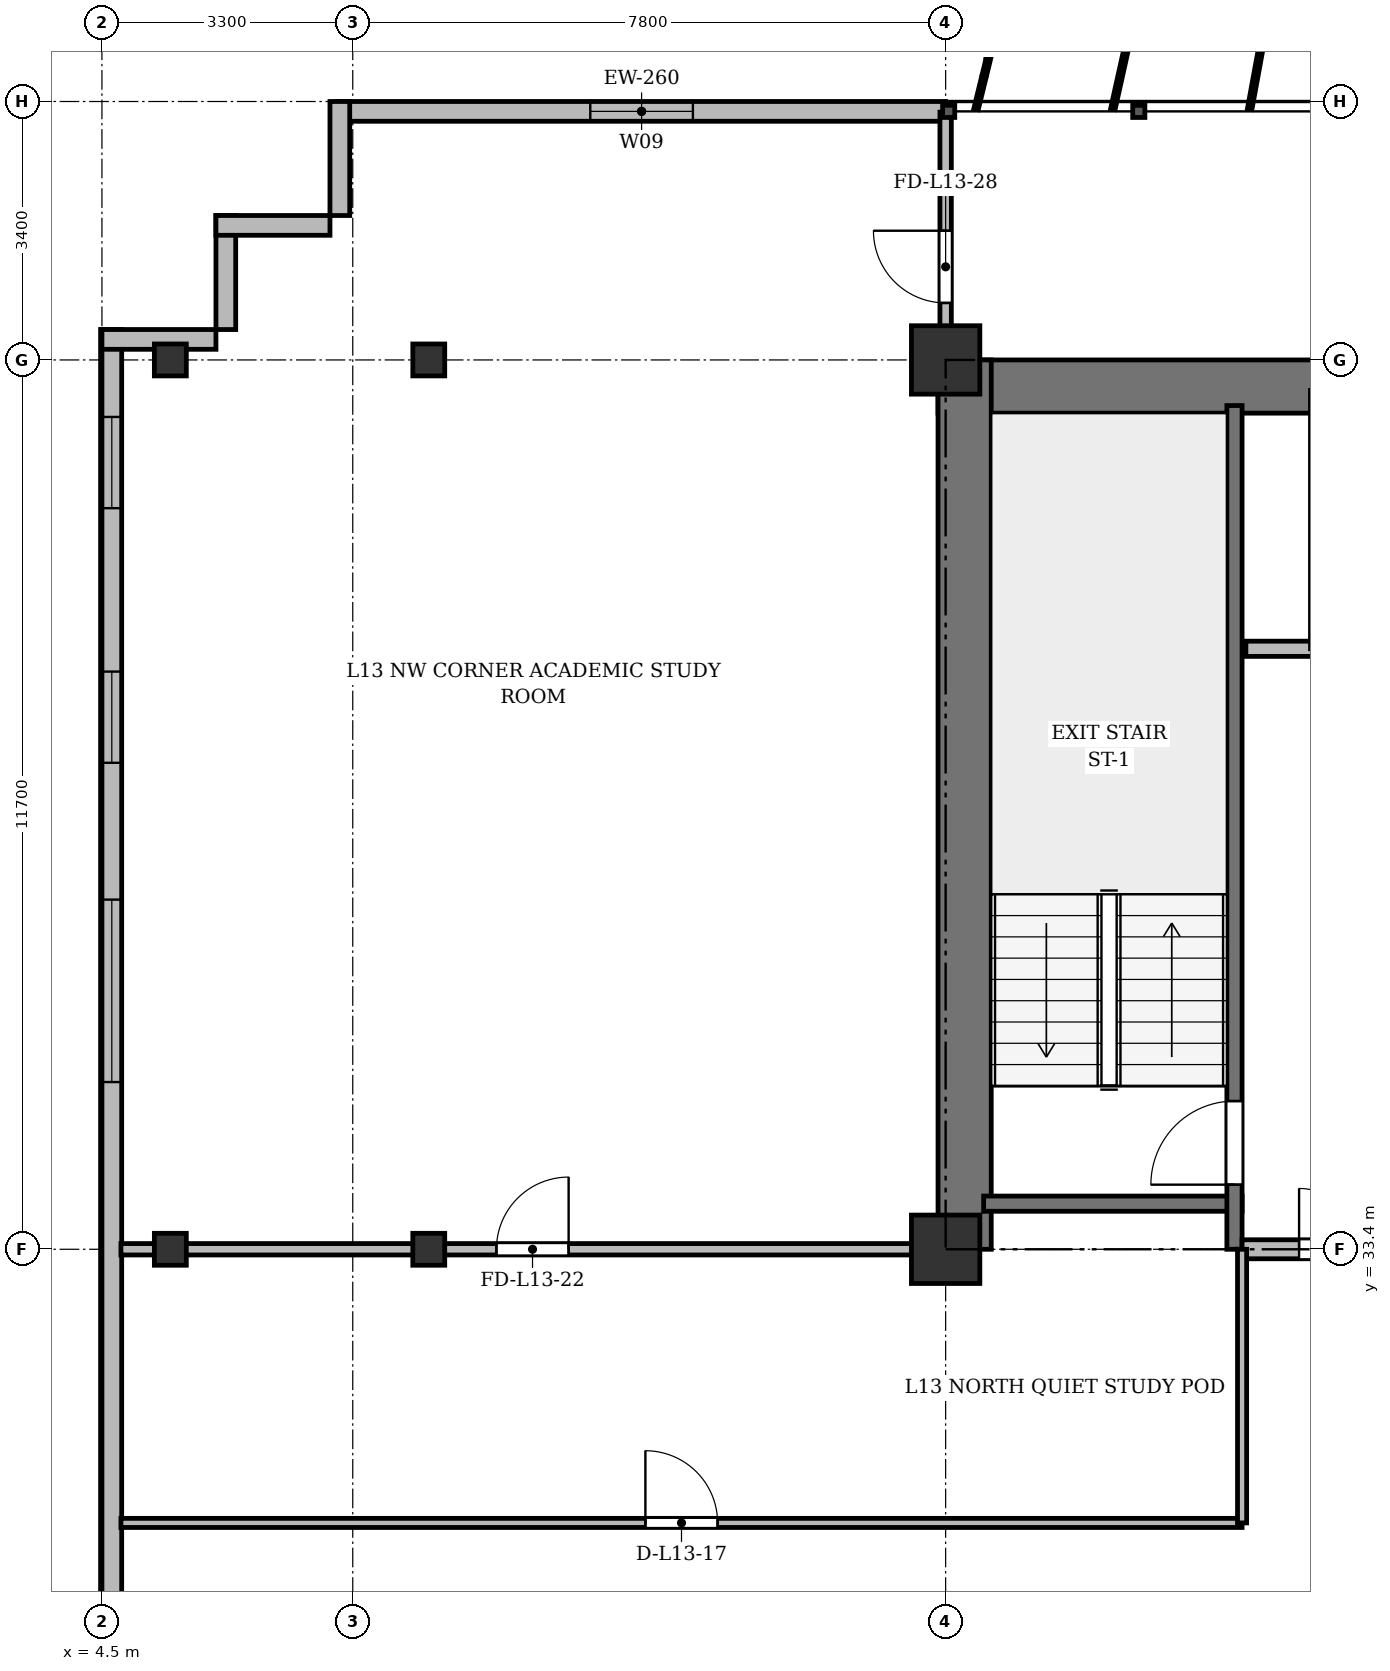
"""IFC4 building model, lengths in metres.
Left out: names, types, materials, properties, quantities, classifications, styles, units other than length and angle.
Written with IfcOpenShell. Run it as: python <this file> out.ifc"""

import sys

from ifc_helpers import new_model, si_unit, direction, frame, frame_2d, origin, origin_2d, place, context, subcontext, project, spatial, rectangle, i_section, extrude, source, transform, mapped, element, fill, save


model = new_model("IFC4")
c1 = context("Model", 3, precision=1e-05, world=origin(), true_north=direction((0.0, 1.0)))
c2 = subcontext(c1, "Body", "Model", "MODEL_VIEW")
j1 = project(units=[si_unit("LENGTHUNIT", "METRE"), si_unit("PLANEANGLEUNIT", "RADIAN")], contexts=[c1])
p1 = place(None, origin())
s1 = spatial("IfcSite", under=j1, at=p1, CompositionType="ELEMENT")
p2 = place(p1, origin())
s2 = spatial("IfcBuilding", under=s1, at=p2, CompositionType="ELEMENT")
p3 = place(p2, frame((0.0, 0.0, 52.3)))
s3 = spatial("IfcBuildingStorey", under=s2, at=p3, CompositionType="ELEMENT", Elevation=52.3)
m1 = source(origin(), c2, "Body", "SweptSolid", [
    extrude(i_section(OverallWidth=0.42, OverallDepth=0.42, WebThickness=0.026, FlangeThickness=0.04, at=origin_2d()), origin(), (0.0, 0.0, 1.0), 3.6),
])
for number, where, z_axis, x_axis in (
    (1, (5.4, 33.4, 0.0), (0.0, 0.0, 1.0), (1.0, 0.0, 0.0)),
    (2, (5.4, 45.1, 0.0), (0.0, 0.0, 1.0), (1.0, 0.0, 0.0)),
    (3, (8.8, 33.4, 0.0), (0.0, 0.0, 1.0), (1.0, 0.0, 0.0)),
    (4, (8.8, 45.1, 0.0), (0.0, 0.0, 1.0), (1.0, 0.0, 0.0)),
):
    element("IfcColumn", number, at=place(p3, frame(where, z_axis=z_axis, x_axis=x_axis)), inside=s3, PredefinedType="COLUMN", context=c2, shape_type="MappedRepresentation", body=[
        mapped(m1, transform((0.0, 0.0, 0.0), x_axis=(1.0, 0.0, 0.0), y_axis=(0.0, 1.0, 0.0), z_axis=(0.0, 0.0, 1.0), scale=1.0)),
    ])
m2 = source(origin(), c2, "Body", "SweptSolid", [
    extrude(rectangle(XDim=0.9, YDim=0.9, at=origin_2d()), origin(), (0.0, 0.0, 1.0), 3.6),
])
for number, where, z_axis, x_axis in (
    (5, (15.6, 33.4, 0.0), (0.0, 0.0, 1.0), (1.0, 0.0, 0.0)),
    (6, (15.6, 45.1, 0.0), (0.0, 0.0, 1.0), (1.0, 0.0, 0.0)),
):
    element("IfcColumn", number, at=place(p3, frame(where, z_axis=z_axis, x_axis=x_axis)), inside=s3, PredefinedType="COLUMN", context=c2, shape_type="MappedRepresentation", body=[
        mapped(m2, transform((0.0, 0.0, 0.0), x_axis=(1.0, 0.0, 0.0), y_axis=(0.0, 1.0, 0.0), z_axis=(0.0, 0.0, 1.0), scale=1.0)),
    ])
p4 = place(p3, frame((7.6, 48.37, 0.0), z_axis=(0.0, 0.0, 1.0), x_axis=(1.0, 0.0, 0.0)))
e7 = element("IfcWall", 7, at=p4, inside=s3, PredefinedType="SOLIDWALL", context=c2, shape_type="SweptSolid", body=[
    extrude(rectangle(XDim=8.0, YDim=0.26, at=frame_2d((4.0, 0.0))), origin(), (0.0, 0.0, 1.0), 3.34),
])
p5 = place(p4, frame((3.325, 0.0, 0.9)))
e8 = element("IfcOpeningElement", 8, at=p5, cuts=e7, PredefinedType="OPENING", context=c2, shape_type="SweptSolid", body=[
    extrude(rectangle(XDim=1.35, YDim=1.5, at=frame_2d((0.675, 0.75))), frame((0.0, 0.14, 0.0), z_axis=(0.0, -1.0, 0.0), x_axis=(1.0, 0.0, 0.0)), (0.0, 0.0, 1.0), 0.28),
])
p6 = place(p3, frame((4.63, 5.9, 0.0), z_axis=(0.0, 0.0, 1.0), x_axis=(0.0, 1.0, 0.0)))
e9 = element("IfcWall", 9, at=p6, inside=s3, PredefinedType="SOLIDWALL", context=c2, shape_type="SweptSolid", body=[
    extrude(rectangle(XDim=39.6, YDim=0.26, at=frame_2d((19.8, 0.0))), origin(), (0.0, 0.0, 1.0), 3.34),
])
p7 = place(p6, frame((1.45, 0.0, 0.92)))
e10 = element("IfcOpeningElement", 10, at=p7, cuts=e9, PredefinedType="OPENING", context=c2, shape_type="SweptSolid", body=[
    extrude(rectangle(XDim=1.2, YDim=1.65, at=frame_2d((0.6, 0.825))), frame((0.0, 0.14, 0.0), z_axis=(0.0, -1.0, 0.0), x_axis=(1.0, 0.0, 0.0)), (0.0, 0.0, 1.0), 0.28),
])
p8 = place(p6, frame((4.3, 0.0, 0.92)))
e11 = element("IfcOpeningElement", 11, at=p8, cuts=e9, PredefinedType="OPENING", context=c2, shape_type="SweptSolid", body=[
    extrude(rectangle(XDim=2.4, YDim=2.1, at=frame_2d((1.2, 1.05))), frame((0.0, 0.14, 0.0), z_axis=(0.0, -1.0, 0.0), x_axis=(1.0, 0.0, 0.0)), (0.0, 0.0, 1.0), 0.28),
])
p9 = place(p6, frame((8.5, 0.0, 0.92)))
e12 = element("IfcOpeningElement", 12, at=p9, cuts=e9, PredefinedType="OPENING", context=c2, shape_type="SweptSolid", body=[
    extrude(rectangle(XDim=2.4, YDim=2.1, at=frame_2d((1.2, 1.05))), frame((0.0, 0.14, 0.0), z_axis=(0.0, -1.0, 0.0), x_axis=(1.0, 0.0, 0.0)), (0.0, 0.0, 1.0), 0.28),
])
p10 = place(p6, frame((29.7, 0.0, 0.92)))
e13 = element("IfcOpeningElement", 13, at=p10, cuts=e9, PredefinedType="OPENING", context=c2, shape_type="SweptSolid", body=[
    extrude(rectangle(XDim=2.4, YDim=2.1, at=frame_2d((1.2, 1.05))), frame((0.0, 0.14, 0.0), z_axis=(0.0, -1.0, 0.0), x_axis=(1.0, 0.0, 0.0)), (0.0, 0.0, 1.0), 0.28),
])
p11 = place(p6, frame((33.9, 0.0, 0.92)))
e14 = element("IfcOpeningElement", 14, at=p11, cuts=e9, PredefinedType="OPENING", context=c2, shape_type="SweptSolid", body=[
    extrude(rectangle(XDim=1.2, YDim=1.65, at=frame_2d((0.6, 0.825))), frame((0.0, 0.14, 0.0), z_axis=(0.0, -1.0, 0.0), x_axis=(1.0, 0.0, 0.0)), (0.0, 0.0, 1.0), 0.28),
])
p12 = place(p6, frame((37.25, 0.0, 0.92)))
e15 = element("IfcOpeningElement", 15, at=p12, cuts=e9, PredefinedType="OPENING", context=c2, shape_type="SweptSolid", body=[
    extrude(rectangle(XDim=1.2, YDim=1.65, at=frame_2d((0.6, 0.825))), frame((0.0, 0.14, 0.0), z_axis=(0.0, -1.0, 0.0), x_axis=(1.0, 0.0, 0.0)), (0.0, 0.0, 1.0), 0.28),
])
p13 = place(p3, frame((4.5, 45.37, 0.0), z_axis=(0.0, 0.0, 1.0), x_axis=(1.0, 0.0, 0.0)))
e16 = element("IfcWall", 16, at=p13, inside=s3, PredefinedType="SOLIDWALL", context=c2, shape_type="SweptSolid", body=[
    extrude(rectangle(XDim=1.5, YDim=0.26, at=frame_2d((0.75, 0.0))), origin(), (0.0, 0.0, 1.0), 2.69),
])
for number, where, z_axis, x_axis in (
    (17, (6.13, 45.5, 0.0), (0.0, 0.0, 1.0), (0.0, 1.0, 0.0)),
    (18, (6.0, 46.87, 0.0), (0.0, 0.0, 1.0), (1.0, 0.0, 0.0)),
    (19, (7.63, 47.0, 0.0), (0.0, 0.0, 1.0), (0.0, 1.0, 0.0)),
):
    element("IfcWall", number, at=place(p3, frame(where, z_axis=z_axis, x_axis=x_axis)), inside=s3, PredefinedType="SOLIDWALL", context=c2, shape_type="SweptSolid", body=[
        extrude(rectangle(XDim=1.5, YDim=0.26, at=frame_2d((0.75, 0.0))), origin(), (0.0, 0.0, 1.0), 3.34),
    ])
p14 = place(p3, frame((15.5, 44.75, 0.0), z_axis=(0.0, 0.0, 1.0), x_axis=(1.0, 0.0, 0.0)))
e20 = element("IfcWall", 20, at=p14, inside=s3, PredefinedType="SHEAR", context=c2, shape_type="SweptSolid", body=[
    extrude(rectangle(XDim=43.4, YDim=0.7, at=frame_2d((21.7, 0.0))), origin(), (0.0, 0.0, 1.0), 3.34),
])
p15 = place(p3, frame((15.85, 33.4, 0.0), z_axis=(0.0, 0.0, 1.0), x_axis=(0.0, 1.0, 0.0)))
e21 = element("IfcWall", 21, at=p15, inside=s3, PredefinedType="SHEAR", context=c2, shape_type="SweptSolid", body=[
    extrude(rectangle(XDim=11.7, YDim=0.7, at=frame_2d((5.85, 0.0))), origin(), (0.0, 0.0, 1.0), 3.34),
])
p16 = place(p3, frame((16.1, 34.0, 0.0), z_axis=(0.0, 0.0, 1.0), x_axis=(1.0, 0.0, 0.0)))
e22 = element("IfcWall", 22, at=p16, inside=s3, PredefinedType="SHEAR", context=c2, shape_type="SweptSolid", body=[
    extrude(rectangle(XDim=3.4, YDim=0.2, at=frame_2d((1.7, 0.0))), origin(), (0.0, 0.0, 1.0), 3.34),
])
p17 = place(p3, frame((19.4, 33.4, 0.0), z_axis=(0.0, 0.0, 1.0), x_axis=(0.0, 1.0, 0.0)))
e23 = element("IfcWall", 23, at=p17, inside=s3, PredefinedType="SHEAR", context=c2, shape_type="SweptSolid", body=[
    extrude(rectangle(XDim=11.1, YDim=0.2, at=frame_2d((5.55, 0.0))), origin(), (0.0, 0.0, 1.0), 3.34),
])
p18 = place(p17, frame((0.85, 0.0, 0.0)))
e24 = element("IfcOpeningElement", 24, at=p18, cuts=e23, PredefinedType="OPENING", context=c2, shape_type="SweptSolid", body=[
    extrude(rectangle(XDim=1.1, YDim=2.15, at=frame_2d((0.55, 1.075))), frame((0.0, 0.11, 0.0), z_axis=(0.0, -1.0, 0.0), x_axis=(1.0, 0.0, 0.0)), (0.0, 0.0, 1.0), 0.22),
])
p19 = place(p3, frame((19.55, 41.3, 0.0), z_axis=(0.0, 0.0, 1.0), x_axis=(1.0, 0.0, 0.0)))
e25 = element("IfcWall", 25, at=p19, inside=s3, PredefinedType="SOLIDWALL", context=c2, shape_type="SweptSolid", body=[
    extrude(rectangle(XDim=6.75, YDim=0.2, at=frame_2d((3.375, 0.0))), origin(), (0.0, 0.0, 1.0), 3.34),
])
p20 = place(p19, frame((1.7, 0.0, 0.0)))
e26 = element("IfcOpeningElement", 26, at=p20, cuts=e25, PredefinedType="OPENING", context=c2, shape_type="SweptSolid", body=[
    extrude(rectangle(XDim=1.1, YDim=2.15, at=frame_2d((0.55, 1.075))), frame((0.0, 0.11, 0.0), z_axis=(0.0, -1.0, 0.0), x_axis=(1.0, 0.0, 0.0)), (0.0, 0.0, 1.0), 0.22),
])
p21 = place(p19, frame((4.4, 0.0, 0.0)))
e27 = element("IfcOpeningElement", 27, at=p21, cuts=e25, PredefinedType="OPENING", context=c2, shape_type="SweptSolid", body=[
    extrude(rectangle(XDim=1.1, YDim=2.15, at=frame_2d((0.55, 1.075))), frame((0.0, 0.11, 0.0), z_axis=(0.0, -1.0, 0.0), x_axis=(1.0, 0.0, 0.0)), (0.0, 0.0, 1.0), 0.22),
])
p22 = place(p3, frame((19.5, 33.4, 0.0), z_axis=(0.0, 0.0, 1.0), x_axis=(1.0, 0.0, 0.0)))
e28 = element("IfcWall", 28, at=p22, inside=s3, PredefinedType="PARTITIONING", context=c2, shape_type="SweptSolid", body=[
    extrude(rectangle(XDim=6.8, YDim=0.25, at=frame_2d((3.4, 0.0))), origin(), (0.0, 0.0, 1.0), 2.69),
])
p23 = place(p22, frame((0.75, 0.0, 0.0)))
e29 = element("IfcOpeningElement", 29, at=p23, cuts=e28, PredefinedType="OPENING", context=c2, shape_type="SweptSolid", body=[
    extrude(rectangle(XDim=1.6, YDim=2.2, at=frame_2d((0.8, 1.1))), frame((0.0, 0.135, 0.0), z_axis=(0.0, -1.0, 0.0), x_axis=(1.0, 0.0, 0.0)), (0.0, 0.0, 1.0), 0.27),
])
p24 = place(p3, frame((4.75, 29.8, 0.0), z_axis=(0.0, 0.0, 1.0), x_axis=(1.0, 0.0, 0.0)))
e30 = element("IfcWall", 30, at=p24, inside=s3, PredefinedType="PARTITIONING", context=c2, shape_type="SweptSolid", body=[
    extrude(rectangle(XDim=14.75, YDim=0.12, at=frame_2d((7.375, 0.0))), origin(), (0.0, 0.0, 1.0), 2.752),
])
p25 = place(p24, frame((6.9, 0.0, 0.0)))
e31 = element("IfcOpeningElement", 31, at=p25, cuts=e30, PredefinedType="OPENING", context=c2, shape_type="SweptSolid", body=[
    extrude(rectangle(XDim=0.95, YDim=2.15, at=frame_2d((0.475, 1.075))), frame((0.0, 0.07, 0.0), z_axis=(0.0, -1.0, 0.0), x_axis=(1.0, 0.0, 0.0)), (0.0, 0.0, 1.0), 0.14),
])
p26 = place(p3, frame((19.5, 29.8, 0.0), z_axis=(0.0, 0.0, 1.0), x_axis=(0.0, 1.0, 0.0)))
e32 = element("IfcWall", 32, at=p26, inside=s3, PredefinedType="PARTITIONING", context=c2, shape_type="SweptSolid", body=[
    extrude(rectangle(XDim=3.6, YDim=0.12, at=frame_2d((1.8, 0.0))), origin(), (0.0, 0.0, 1.0), 2.69),
])
p27 = place(p3, frame((4.75, 33.4, 0.0), z_axis=(0.0, 0.0, 1.0), x_axis=(1.0, 0.0, 0.0)))
e33 = element("IfcWall", 33, at=p27, inside=s3, PredefinedType="PARTITIONING", context=c2, shape_type="SweptSolid", body=[
    extrude(rectangle(XDim=10.85, YDim=0.15, at=frame_2d((5.425, 0.0))), origin(), (0.0, 0.0, 1.0), 2.69),
])
p28 = place(p27, frame((4.94, 0.0, 0.0)))
e34 = element("IfcOpeningElement", 34, at=p28, cuts=e33, PredefinedType="OPENING", context=c2, shape_type="SweptSolid", body=[
    extrude(rectangle(XDim=0.95, YDim=2.15, at=frame_2d((0.475, 1.075))), frame((0.0, 0.085, 0.0), z_axis=(0.0, -1.0, 0.0), x_axis=(1.0, 0.0, 0.0)), (0.0, 0.0, 1.0), 0.17),
])
p29 = place(p3, frame((15.6, 44.75, 0.0), z_axis=(0.0, 0.0, 1.0), x_axis=(0.0, 1.0, 0.0)))
e35 = element("IfcWall", 35, at=p29, inside=s3, PredefinedType="PARTITIONING", context=c2, shape_type="SweptSolid", body=[
    extrude(rectangle(XDim=3.61, YDim=0.15, at=frame_2d((1.805, 0.0))), origin(), (0.0, 0.0, 1.0), 2.752),
])
p30 = place(p29, frame((1.1, 0.0, 0.0)))
e36 = element("IfcOpeningElement", 36, at=p30, cuts=e35, PredefinedType="OPENING", context=c2, shape_type="SweptSolid", body=[
    extrude(rectangle(XDim=0.95, YDim=2.15, at=frame_2d((0.475, 1.075))), frame((0.0, 0.085, 0.0), z_axis=(0.0, -1.0, 0.0), x_axis=(1.0, 0.0, 0.0)), (0.0, 0.0, 1.0), 0.17),
])
m3 = source(origin(), c2, "Body", "SweptSolid", [
    extrude(rectangle(XDim=1.35, YDim=1.5, at=frame_2d((0.675, 0.75))), frame((0.0, 0.03, 0.0), z_axis=(0.0, -1.0, 0.0), x_axis=(1.0, 0.0, 0.0)), (0.0, 0.0, 1.0), 0.06),
])
p31 = place(p5, origin())
e37 = element("IfcWindow", 37, at=p31, inside=s3, PartitioningType="SINGLE_PANEL", PredefinedType="WINDOW", context=c2, shape_type="MappedRepresentation", body=[
    mapped(m3, transform((0.0, 0.0, 0.0), x_axis=(1.0, 0.0, 0.0), y_axis=(0.0, 1.0, 0.0), z_axis=(0.0, 0.0, 1.0), scale=1.0)),
])
fill(e8, e37)
m4 = source(origin(), c2, "Body", "SweptSolid", [
    extrude(rectangle(XDim=2.4, YDim=2.1, at=frame_2d((1.2, 1.05))), frame((0.0, 0.03, 0.0), z_axis=(0.0, -1.0, 0.0), x_axis=(1.0, 0.0, 0.0)), (0.0, 0.0, 1.0), 0.06),
])
p32 = place(p10, origin())
e38 = element("IfcWindow", 38, at=p32, inside=s3, PartitioningType="SINGLE_PANEL", PredefinedType="WINDOW", context=c2, shape_type="MappedRepresentation", body=[
    mapped(m4, transform((0.0, 0.0, 0.0), x_axis=(1.0, 0.0, 0.0), y_axis=(0.0, 1.0, 0.0), z_axis=(0.0, 0.0, 1.0), scale=1.0)),
])
fill(e13, e38)
m5 = source(origin(), c2, "Body", "SweptSolid", [
    extrude(rectangle(XDim=1.2, YDim=1.65, at=frame_2d((0.6, 0.825))), frame((0.0, 0.03, 0.0), z_axis=(0.0, -1.0, 0.0), x_axis=(1.0, 0.0, 0.0)), (0.0, 0.0, 1.0), 0.06),
])
p33 = place(p11, origin())
e39 = element("IfcWindow", 39, at=p33, inside=s3, PartitioningType="SINGLE_PANEL", PredefinedType="WINDOW", context=c2, shape_type="MappedRepresentation", body=[
    mapped(m5, transform((0.0, 0.0, 0.0), x_axis=(1.0, 0.0, 0.0), y_axis=(0.0, 1.0, 0.0), z_axis=(0.0, 0.0, 1.0), scale=1.0)),
])
fill(e14, e39)
p34 = place(p12, origin())
e40 = element("IfcWindow", 40, at=p34, inside=s3, PartitioningType="SINGLE_PANEL", PredefinedType="WINDOW", context=c2, shape_type="MappedRepresentation", body=[
    mapped(m5, transform((0.0, 0.0, 0.0), x_axis=(1.0, 0.0, 0.0), y_axis=(0.0, 1.0, 0.0), z_axis=(0.0, 0.0, 1.0), scale=1.0)),
])
fill(e15, e40)
m6 = source(origin(), c2, "Body", "SweptSolid", [
    extrude(rectangle(XDim=1.1, YDim=2.15, at=frame_2d((0.55, 1.075))), frame((0.0, 0.025, 0.0), z_axis=(0.0, -1.0, 0.0), x_axis=(1.0, 0.0, 0.0)), (0.0, 0.0, 1.0), 0.05),
])
p35 = place(p18, origin())
e41 = element("IfcDoor", 41, at=p35, inside=s3, OperationType="SINGLE_SWING_LEFT", PredefinedType="DOOR", context=c2, shape_type="MappedRepresentation", body=[
    mapped(m6, transform((0.0, 0.0, 0.0), x_axis=(1.0, 0.0, 0.0), y_axis=(0.0, 1.0, 0.0), z_axis=(0.0, 0.0, 1.0), scale=1.0)),
])
fill(e24, e41)
m7 = source(origin(), c2, "Body", "SweptSolid", [
    extrude(rectangle(XDim=1.6, YDim=2.2, at=frame_2d((0.8, 1.1))), frame((0.0, 0.025, 0.0), z_axis=(0.0, -1.0, 0.0), x_axis=(1.0, 0.0, 0.0)), (0.0, 0.0, 1.0), 0.05),
])
p36 = place(p23, origin())
e42 = element("IfcDoor", 42, at=p36, inside=s3, OperationType="DOUBLE_DOOR_SINGLE_SWING", PredefinedType="DOOR", context=c2, shape_type="MappedRepresentation", body=[
    mapped(m7, transform((0.0, 0.0, 0.0), x_axis=(1.0, 0.0, 0.0), y_axis=(0.0, 1.0, 0.0), z_axis=(0.0, 0.0, 1.0), scale=1.0)),
])
fill(e29, e42)
m8 = source(origin(), c2, "Body", "SweptSolid", [
    extrude(rectangle(XDim=0.95, YDim=2.15, at=frame_2d((0.475, 1.075))), frame((0.0, 0.025, 0.0), z_axis=(0.0, -1.0, 0.0), x_axis=(1.0, 0.0, 0.0)), (0.0, 0.0, 1.0), 0.05),
])
p37 = place(p25, origin())
e43 = element("IfcDoor", 43, at=p37, inside=s3, OperationType="SINGLE_SWING_LEFT", PredefinedType="DOOR", context=c2, shape_type="MappedRepresentation", body=[
    mapped(m8, transform((0.0, 0.0, 0.0), x_axis=(1.0, 0.0, 0.0), y_axis=(0.0, 1.0, 0.0), z_axis=(0.0, 0.0, 1.0), scale=1.0)),
])
fill(e31, e43)
p38 = place(p28, origin())
e44 = element("IfcDoor", 44, at=p38, inside=s3, OperationType="SINGLE_SWING_RIGHT", PredefinedType="DOOR", context=c2, shape_type="MappedRepresentation", body=[
    mapped(m8, transform((0.0, 0.0, 0.0), x_axis=(1.0, 0.0, 0.0), y_axis=(0.0, 1.0, 0.0), z_axis=(0.0, 0.0, 1.0), scale=1.0)),
])
fill(e34, e44)
p39 = place(p30, origin())
e45 = element("IfcDoor", 45, at=p39, inside=s3, OperationType="SINGLE_SWING_RIGHT", PredefinedType="DOOR", context=c2, shape_type="MappedRepresentation", body=[
    mapped(m8, transform((0.0, 0.0, 0.0), x_axis=(1.0, 0.0, 0.0), y_axis=(0.0, 1.0, 0.0), z_axis=(0.0, 0.0, 1.0), scale=1.0)),
])
fill(e36, e45)
save(model, sys.argv[1])
